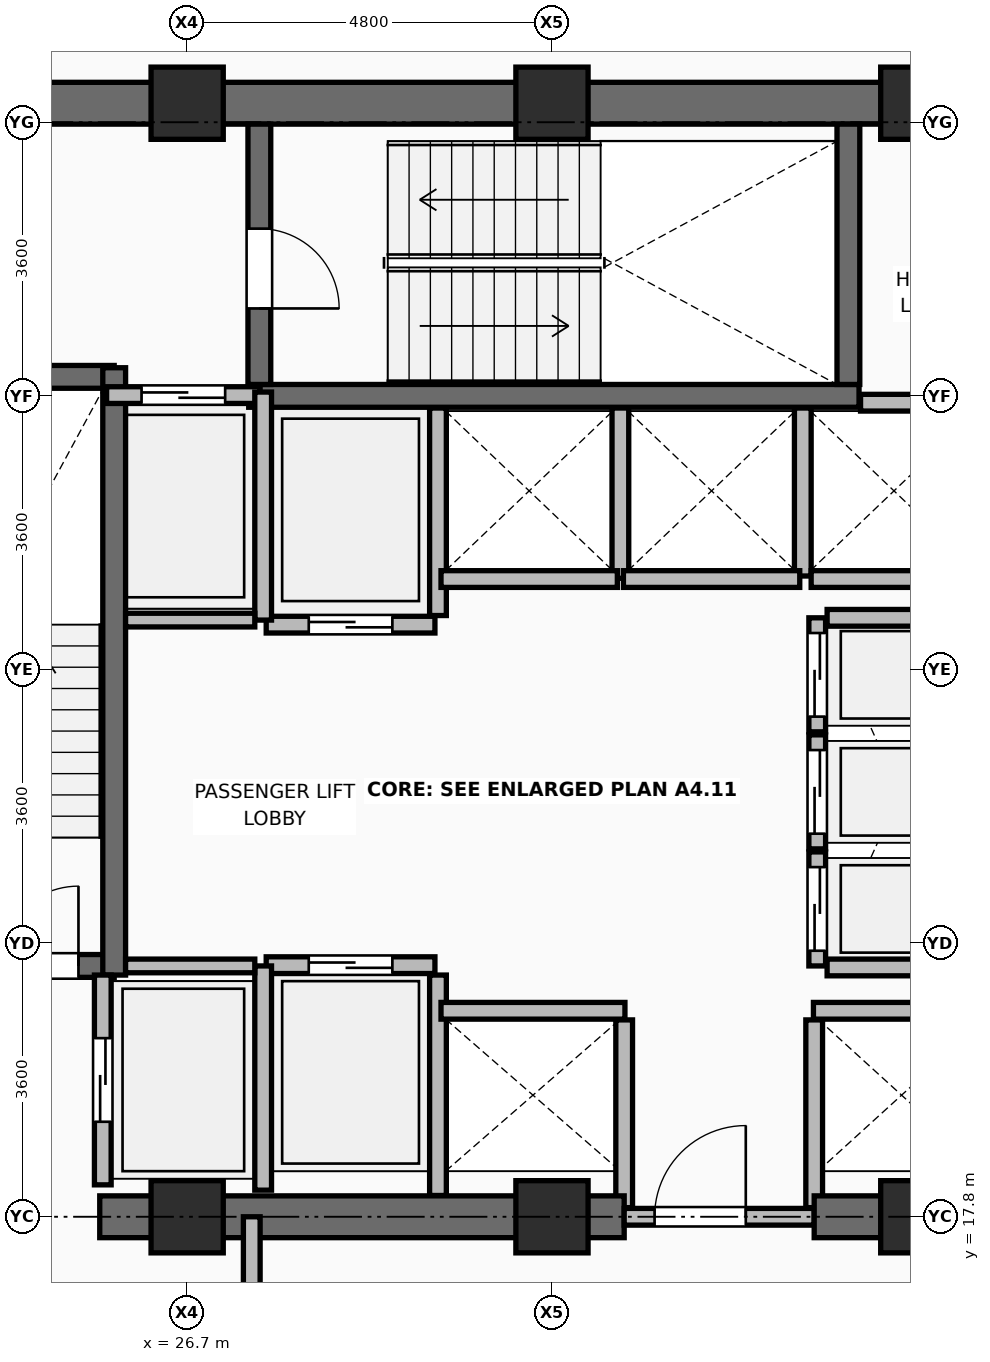
"""IFC4 building model, lengths in metres.
Left out: names, types, materials, properties, quantities, classifications, styles, units other than length and angle.
Written with IfcOpenShell. Run it as: python <this file> out.ifc"""

import sys

from ifc_helpers import new_model, si_unit, direction, frame, frame_2d, origin, origin_2d, place, context, subcontext, project, spatial, rectangle, extrude, element, fill, save


model = new_model("IFC4")
c1 = context("Model", 3, precision=1e-05, world=origin(), true_north=direction((0.0, 1.0)))
c2 = subcontext(c1, "Body", "Model", "MODEL_VIEW")
j1 = project(units=[si_unit("LENGTHUNIT", "METRE"), si_unit("PLANEANGLEUNIT", "RADIAN")], contexts=[c1])
p1 = place(None, origin())
s1 = spatial("IfcSite", under=j1, at=p1, CompositionType="ELEMENT")
p2 = place(p1, origin())
s2 = spatial("IfcBuilding", under=s1, at=p2, CompositionType="ELEMENT")
p3 = place(p2, frame((0.0, 0.0, 157.2)))
s3 = spatial("IfcBuildingStorey", under=s2, at=p3, CompositionType="ELEMENT", Elevation=157.2)
for number, where, z_axis, x_axis in (
    (1, (26.7, 17.8, 0.0), (0.0, 0.0, 1.0), (1.0, 0.0, 0.0)),
    (2, (31.5, 17.8, 0.0), (0.0, 0.0, 1.0), (1.0, 0.0, 0.0)),
    (3, (36.3, 17.8, 0.0), (0.0, 0.0, 1.0), (1.0, 0.0, 0.0)),
    (4, (26.7, 32.45, 0.0), (0.0, 0.0, 1.0), (1.0, 0.0, 0.0)),
    (5, (31.5, 32.45, 0.0), (0.0, 0.0, 1.0), (1.0, 0.0, 0.0)),
    (6, (36.3, 32.45, 0.0), (0.0, 0.0, 1.0), (1.0, 0.0, 0.0)),
):
    element("IfcColumn", number, at=place(p3, frame(where, z_axis=z_axis, x_axis=x_axis)), inside=s3, PredefinedType="COLUMN", context=c2, shape_type="SweptSolid", body=[
        extrude(rectangle(XDim=0.95, YDim=0.95, at=origin_2d()), origin(), (0.0, 0.0, 1.0), 3.75),
    ])
p4 = place(p3, frame((30.0, 18.08, 0.0), z_axis=(0.0, 0.0, 1.0), x_axis=(0.0, 1.0, 0.0)))
e7 = element("IfcWall", 7, at=p4, inside=s3, PredefinedType="PARTITIONING", context=c2, shape_type="SweptSolid", body=[
    extrude(rectangle(XDim=2.9, YDim=0.22, at=frame_2d((1.45, 0.0))), origin(), (0.0, 0.0, 1.0), 3.545),
])
for number, where, z_axis, x_axis in (
    (8, (32.45, 17.92, 0.0), (0.0, 0.0, 1.0), (0.0, 1.0, 0.0)),
    (9, (34.95, 17.92, 0.0), (0.0, 0.0, 1.0), (0.0, 1.0, 0.0)),
):
    element("IfcWall", number, at=place(p3, frame(where, z_axis=z_axis, x_axis=x_axis)), inside=s3, PredefinedType="PARTITIONING", context=c2, shape_type="SweptSolid", body=[
        extrude(rectangle(XDim=2.47, YDim=0.22, at=frame_2d((1.235, 0.0))), origin(), (0.0, 0.0, 1.0), 3.006),
    ])
p5 = place(p3, frame((30.0, 25.71, 0.0), z_axis=(0.0, 0.0, 1.0), x_axis=(0.0, 1.0, 0.0)))
e10 = element("IfcWall", 10, at=p5, inside=s3, PredefinedType="PARTITIONING", context=c2, shape_type="SweptSolid", body=[
    extrude(rectangle(XDim=2.73, YDim=0.22, at=frame_2d((1.365, 0.0))), origin(), (0.0, 0.0, 1.0), 3.545),
])
p6 = place(p3, frame((32.4, 26.2, 0.0), z_axis=(0.0, 0.0, 1.0), x_axis=(0.0, 1.0, 0.0)))
e11 = element("IfcWall", 11, at=p6, inside=s3, PredefinedType="PARTITIONING", context=c2, shape_type="SweptSolid", body=[
    extrude(rectangle(XDim=2.24, YDim=0.22, at=frame_2d((1.12, 0.0))), origin(), (0.0, 0.0, 1.0), 3.545),
])
p7 = place(p3, frame((34.8, 26.23, 0.0), z_axis=(0.0, 0.0, 1.0), x_axis=(0.0, 1.0, 0.0)))
e12 = element("IfcWall", 12, at=p7, inside=s3, PredefinedType="PARTITIONING", context=c2, shape_type="SweptSolid", body=[
    extrude(rectangle(XDim=2.21, YDim=0.22, at=frame_2d((1.105, 0.0))), origin(), (0.0, 0.0, 1.0), 3.545),
])
p8 = place(p3, frame((34.91, 26.19, 0.0), z_axis=(0.0, 0.0, 1.0), x_axis=(1.0, 0.0, 0.0)))
e13 = element("IfcWall", 13, at=p8, inside=s3, PredefinedType="PARTITIONING", context=c2, shape_type="SweptSolid", body=[
    extrude(rectangle(XDim=2.14, YDim=0.22, at=frame_2d((1.07, 0.0))), origin(), (0.0, 0.0, 1.0), 3.545),
])
p9 = place(p3, frame((25.55, 17.8, 0.0), z_axis=(0.0, 0.0, 1.0), x_axis=(1.0, 0.0, 0.0)))
e14 = element("IfcWall", 14, at=p9, inside=s3, PredefinedType="SHEAR", context=c2, shape_type="SweptSolid", body=[
    extrude(rectangle(XDim=6.9, YDim=0.55, at=frame_2d((3.45, 0.0))), origin(), (0.0, 0.0, 1.0), 3.57),
])
p10 = place(p3, frame((32.45, 17.8, 0.0), z_axis=(0.0, 0.0, 1.0), x_axis=(1.0, 0.0, 0.0)))
e15 = element("IfcWall", 15, at=p10, inside=s3, PredefinedType="PARTITIONING", context=c2, shape_type="SweptSolid", body=[
    extrude(rectangle(XDim=2.5, YDim=0.22, at=frame_2d((1.25, 0.0))), origin(), (0.0, 0.0, 1.0), 3.006),
])
p11 = place(p10, frame((0.4, 0.0, 0.0)))
e16 = element("IfcOpeningElement", 16, at=p11, cuts=e15, PredefinedType="OPENING", context=c2, shape_type="SweptSolid", body=[
    extrude(rectangle(XDim=1.2, YDim=2.1, at=frame_2d((0.6, 1.05))), frame((0.0, 0.12, 0.0), z_axis=(0.0, -1.0, 0.0), x_axis=(1.0, 0.0, 0.0)), (0.0, 0.0, 1.0), 0.24),
])
p12 = place(p3, frame((34.95, 17.8, 0.0), z_axis=(0.0, 0.0, 1.0), x_axis=(1.0, 0.0, 0.0)))
e17 = element("IfcWall", 17, at=p12, inside=s3, PredefinedType="SHEAR", context=c2, shape_type="SweptSolid", body=[
    extrude(rectangle(XDim=6.425, YDim=0.55, at=frame_2d((3.212, 0.0))), origin(), (0.0, 0.0, 1.0), 3.57),
])
p13 = place(p3, frame((21.625, 32.45, 0.0), z_axis=(0.0, 0.0, 1.0), x_axis=(1.0, 0.0, 0.0)))
e18 = element("IfcWall", 18, at=p13, inside=s3, PredefinedType="SHEAR", context=c2, shape_type="SweptSolid", body=[
    extrude(rectangle(XDim=19.75, YDim=0.55, at=frame_2d((9.875, 0.0))), origin(), (0.0, 0.0, 1.0), 3.57),
])
p14 = place(p13, frame((2.125, 0.0, 0.0)))
e19 = element("IfcOpeningElement", 19, at=p14, cuts=e18, PredefinedType="OPENING", context=c2, shape_type="SweptSolid", body=[
    extrude(rectangle(XDim=1.1, YDim=2.1, at=frame_2d((0.55, 1.05))), frame((0.0, 0.285, 0.0), z_axis=(0.0, -1.0, 0.0), x_axis=(1.0, 0.0, 0.0)), (0.0, 0.0, 1.0), 0.57),
])
p15 = place(p13, frame((15.515, 0.0, 0.0)))
e20 = element("IfcOpeningElement", 20, at=p15, cuts=e18, PredefinedType="OPENING", context=c2, shape_type="SweptSolid", body=[
    extrude(rectangle(XDim=1.0, YDim=2.1, at=frame_2d((0.5, 1.05))), frame((0.0, 0.285, 0.0), z_axis=(0.0, -1.0, 0.0), x_axis=(1.0, 0.0, 0.0)), (0.0, 0.0, 1.0), 0.57),
])
p16 = place(p13, frame((17.525, 0.0, 0.0)))
e21 = element("IfcOpeningElement", 21, at=p16, cuts=e18, PredefinedType="OPENING", context=c2, shape_type="SweptSolid", body=[
    extrude(rectangle(XDim=0.9, YDim=2.1, at=frame_2d((0.45, 1.05))), frame((0.0, 0.285, 0.0), z_axis=(0.0, -1.0, 0.0), x_axis=(1.0, 0.0, 0.0)), (0.0, 0.0, 1.0), 0.57),
])
p17 = place(p3, frame((22.175, 21.1, 0.0), z_axis=(0.0, 0.0, 1.0), x_axis=(1.0, 0.0, 0.0)))
e22 = element("IfcWall", 22, at=p17, inside=s3, PredefinedType="SHEAR", context=c2, shape_type="SweptSolid", body=[
    extrude(rectangle(XDim=3.565, YDim=0.3, at=frame_2d((1.782, 0.0))), origin(), (0.0, 0.0, 1.0), 3.57),
])
p18 = place(p17, frame((2.045, 0.0, 0.0)))
e23 = element("IfcOpeningElement", 23, at=p18, cuts=e22, PredefinedType="OPENING", context=c2, shape_type="SweptSolid", body=[
    extrude(rectangle(XDim=1.05, YDim=2.1, at=frame_2d((0.525, 1.05))), frame((0.0, 0.16, 0.0), z_axis=(0.0, -1.0, 0.0), x_axis=(1.0, 0.0, 0.0)), (0.0, 0.0, 1.0), 0.32),
])
p19 = place(p3, frame((22.175, 28.85, 0.0), z_axis=(0.0, 0.0, 1.0), x_axis=(1.0, 0.0, 0.0)))
e24 = element("IfcWall", 24, at=p19, inside=s3, PredefinedType="SHEAR", context=c2, shape_type="SweptSolid", body=[
    extrude(rectangle(XDim=3.565, YDim=0.3, at=frame_2d((1.782, 0.0))), origin(), (0.0, 0.0, 1.0), 3.57),
])
p20 = place(p3, frame((25.74, 20.98, 0.0), z_axis=(0.0, 0.0, 1.0), x_axis=(0.0, 1.0, 0.0)))
e25 = element("IfcWall", 25, at=p20, inside=s3, PredefinedType="SHEAR", context=c2, shape_type="SweptSolid", body=[
    extrude(rectangle(XDim=7.99, YDim=0.3, at=frame_2d((3.995, 0.0))), origin(), (0.0, 0.0, 1.0), 3.57),
])
p21 = place(p3, frame((27.51, 28.6, 0.0), z_axis=(0.0, 0.0, 1.0), x_axis=(1.0, 0.0, 0.0)))
e26 = element("IfcWall", 26, at=p21, inside=s3, PredefinedType="SHEAR", context=c2, shape_type="SweptSolid", body=[
    extrude(rectangle(XDim=8.03, YDim=0.3, at=frame_2d((4.015, 0.0))), origin(), (0.0, 0.0, 1.0), 3.57),
])
p22 = place(p3, frame((27.65, 28.75, 0.0), z_axis=(0.0, 0.0, 1.0), x_axis=(0.0, 1.0, 0.0)))
e27 = element("IfcWall", 27, at=p22, inside=s3, PredefinedType="SHEAR", context=c2, shape_type="SweptSolid", body=[
    extrude(rectangle(XDim=3.425, YDim=0.3, at=frame_2d((1.712, 0.0))), origin(), (0.0, 0.0, 1.0), 3.57),
])
p23 = place(p22, frame((1.0, 0.0, 0.0)))
e28 = element("IfcOpeningElement", 28, at=p23, cuts=e27, PredefinedType="OPENING", context=c2, shape_type="SweptSolid", body=[
    extrude(rectangle(XDim=1.05, YDim=2.1, at=frame_2d((0.525, 1.05))), frame((0.0, 0.16, 0.0), z_axis=(0.0, -1.0, 0.0), x_axis=(1.0, 0.0, 0.0)), (0.0, 0.0, 1.0), 0.32),
])
p24 = place(p3, frame((35.4, 28.75, 0.0), z_axis=(0.0, 0.0, 1.0), x_axis=(0.0, 1.0, 0.0)))
e29 = element("IfcWall", 29, at=p24, inside=s3, PredefinedType="SHEAR", context=c2, shape_type="SweptSolid", body=[
    extrude(rectangle(XDim=3.425, YDim=0.3, at=frame_2d((1.712, 0.0))), origin(), (0.0, 0.0, 1.0), 3.57),
])
p25 = place(p3, frame((25.59, 18.22, 0.0), z_axis=(0.0, 0.0, 1.0), x_axis=(0.0, 1.0, 0.0)))
e30 = element("IfcWall", 30, at=p25, inside=s3, PredefinedType="PARTITIONING", context=c2, shape_type="SweptSolid", body=[
    extrude(rectangle(XDim=2.76, YDim=0.22, at=frame_2d((1.38, 0.0))), origin(), (0.0, 0.0, 1.0), 3.55),
])
p26 = place(p25, frame((0.83, 0.0, 0.0)))
e31 = element("IfcOpeningElement", 31, at=p26, cuts=e30, PredefinedType="OPENING", context=c2, shape_type="SweptSolid", body=[
    extrude(rectangle(XDim=1.1, YDim=2.2, at=frame_2d((0.55, 1.1))), frame((0.0, 0.12, 0.0), z_axis=(0.0, -1.0, 0.0), x_axis=(1.0, 0.0, 0.0)), (0.0, 0.0, 1.0), 0.24),
])
p27 = place(p3, frame((25.64, 28.61, 0.0), z_axis=(0.0, 0.0, 1.0), x_axis=(1.0, 0.0, 0.0)))
e32 = element("IfcWall", 32, at=p27, inside=s3, PredefinedType="PARTITIONING", context=c2, shape_type="SweptSolid", body=[
    extrude(rectangle(XDim=2.02, YDim=0.22, at=frame_2d((1.01, 0.0))), origin(), (0.0, 0.0, 1.0), 3.55),
])
p28 = place(p27, frame((0.46, 0.0, 0.0)))
e33 = element("IfcOpeningElement", 33, at=p28, cuts=e32, PredefinedType="OPENING", context=c2, shape_type="SweptSolid", body=[
    extrude(rectangle(XDim=1.1, YDim=2.2, at=frame_2d((0.55, 1.1))), frame((0.0, 0.12, 0.0), z_axis=(0.0, -1.0, 0.0), x_axis=(1.0, 0.0, 0.0)), (0.0, 0.0, 1.0), 0.24),
])
p29 = place(p3, frame((27.74, 21.11, 0.0), z_axis=(0.0, 0.0, 1.0), x_axis=(1.0, 0.0, 0.0)))
e34 = element("IfcWall", 34, at=p29, inside=s3, PredefinedType="PARTITIONING", context=c2, shape_type="SweptSolid", body=[
    extrude(rectangle(XDim=2.22, YDim=0.22, at=frame_2d((1.11, 0.0))), origin(), (0.0, 0.0, 1.0), 3.55),
])
p30 = place(p29, frame((0.56, 0.0, 0.0)))
e35 = element("IfcOpeningElement", 35, at=p30, cuts=e34, PredefinedType="OPENING", context=c2, shape_type="SweptSolid", body=[
    extrude(rectangle(XDim=1.1, YDim=2.2, at=frame_2d((0.55, 1.1))), frame((0.0, 0.12, 0.0), z_axis=(0.0, -1.0, 0.0), x_axis=(1.0, 0.0, 0.0)), (0.0, 0.0, 1.0), 0.24),
])
p31 = place(p3, frame((27.74, 25.59, 0.0), z_axis=(0.0, 0.0, 1.0), x_axis=(1.0, 0.0, 0.0)))
e36 = element("IfcWall", 36, at=p31, inside=s3, PredefinedType="PARTITIONING", context=c2, shape_type="SweptSolid", body=[
    extrude(rectangle(XDim=2.22, YDim=0.22, at=frame_2d((1.11, 0.0))), origin(), (0.0, 0.0, 1.0), 3.55),
])
p32 = place(p31, frame((0.56, 0.0, 0.0)))
e37 = element("IfcOpeningElement", 37, at=p32, cuts=e36, PredefinedType="OPENING", context=c2, shape_type="SweptSolid", body=[
    extrude(rectangle(XDim=1.1, YDim=2.2, at=frame_2d((0.55, 1.1))), frame((0.0, 0.12, 0.0), z_axis=(0.0, -1.0, 0.0), x_axis=(1.0, 0.0, 0.0)), (0.0, 0.0, 1.0), 0.24),
])
p33 = place(p3, frame((30.04, 20.51, 0.0), z_axis=(0.0, 0.0, 1.0), x_axis=(1.0, 0.0, 0.0)))
e38 = element("IfcWall", 38, at=p33, inside=s3, PredefinedType="PARTITIONING", context=c2, shape_type="SweptSolid", body=[
    extrude(rectangle(XDim=2.42, YDim=0.22, at=frame_2d((1.21, 0.0))), origin(), (0.0, 0.0, 1.0), 3.55),
])
p34 = place(p3, frame((34.94, 20.51, 0.0), z_axis=(0.0, 0.0, 1.0), x_axis=(1.0, 0.0, 0.0)))
e39 = element("IfcWall", 39, at=p34, inside=s3, PredefinedType="PARTITIONING", context=c2, shape_type="SweptSolid", body=[
    extrude(rectangle(XDim=2.24, YDim=0.22, at=frame_2d((1.12, 0.0))), origin(), (0.0, 0.0, 1.0), 3.55),
])
for number, where, z_axis, x_axis in (
    (40, (30.04, 26.19, 0.0), (0.0, 0.0, 1.0), (1.0, 0.0, 0.0)),
    (41, (32.44, 26.19, 0.0), (0.0, 0.0, 1.0), (1.0, 0.0, 0.0)),
):
    element("IfcWall", number, at=place(p3, frame(where, z_axis=z_axis, x_axis=x_axis)), inside=s3, PredefinedType="PARTITIONING", context=c2, shape_type="SweptSolid", body=[
        extrude(rectangle(XDim=2.32, YDim=0.22, at=frame_2d((1.16, 0.0))), origin(), (0.0, 0.0, 1.0), 3.55),
    ])
p35 = place(p3, frame((35.56, 28.51, 0.0), z_axis=(0.0, 0.0, 1.0), x_axis=(1.0, 0.0, 0.0)))
e42 = element("IfcWall", 42, at=p35, inside=s3, PredefinedType="PARTITIONING", context=c2, shape_type="SweptSolid", body=[
    extrude(rectangle(XDim=1.6, YDim=0.22, at=frame_2d((0.8, 0.0))), origin(), (0.0, 0.0, 1.0), 3.55),
])
p36 = place(p3, frame((34.99, 21.1, 0.0), z_axis=(0.0, 0.0, 1.0), x_axis=(0.0, 1.0, 0.0)))
e43 = element("IfcWall", 43, at=p36, inside=s3, PredefinedType="PARTITIONING", context=c2, shape_type="SweptSolid", body=[
    extrude(rectangle(XDim=1.5, YDim=0.22, at=frame_2d((0.75, 0.0))), origin(), (0.0, 0.0, 1.0), 3.55),
])
p37 = place(p36, frame((0.2, 0.0, 0.0)))
e44 = element("IfcOpeningElement", 44, at=p37, cuts=e43, PredefinedType="OPENING", context=c2, shape_type="SweptSolid", body=[
    extrude(rectangle(XDim=1.1, YDim=2.2, at=frame_2d((0.55, 1.1))), frame((0.0, 0.12, 0.0), z_axis=(0.0, -1.0, 0.0), x_axis=(1.0, 0.0, 0.0)), (0.0, 0.0, 1.0), 0.24),
])
p38 = place(p3, frame((34.99, 22.64, 0.0), z_axis=(0.0, 0.0, 1.0), x_axis=(0.0, 1.0, 0.0)))
e45 = element("IfcWall", 45, at=p38, inside=s3, PredefinedType="PARTITIONING", context=c2, shape_type="SweptSolid", body=[
    extrude(rectangle(XDim=1.5, YDim=0.22, at=frame_2d((0.75, 0.0))), origin(), (0.0, 0.0, 1.0), 3.55),
])
p39 = place(p38, frame((0.2, 0.0, 0.0)))
e46 = element("IfcOpeningElement", 46, at=p39, cuts=e45, PredefinedType="OPENING", context=c2, shape_type="SweptSolid", body=[
    extrude(rectangle(XDim=1.1, YDim=2.2, at=frame_2d((0.55, 1.1))), frame((0.0, 0.12, 0.0), z_axis=(0.0, -1.0, 0.0), x_axis=(1.0, 0.0, 0.0)), (0.0, 0.0, 1.0), 0.24),
])
p40 = place(p3, frame((34.99, 24.18, 0.0), z_axis=(0.0, 0.0, 1.0), x_axis=(0.0, 1.0, 0.0)))
e47 = element("IfcWall", 47, at=p40, inside=s3, PredefinedType="PARTITIONING", context=c2, shape_type="SweptSolid", body=[
    extrude(rectangle(XDim=1.5, YDim=0.22, at=frame_2d((0.75, 0.0))), origin(), (0.0, 0.0, 1.0), 3.55),
])
p41 = place(p40, frame((0.2, 0.0, 0.0)))
e48 = element("IfcOpeningElement", 48, at=p41, cuts=e47, PredefinedType="OPENING", context=c2, shape_type="SweptSolid", body=[
    extrude(rectangle(XDim=1.1, YDim=2.2, at=frame_2d((0.55, 1.1))), frame((0.0, 0.12, 0.0), z_axis=(0.0, -1.0, 0.0), x_axis=(1.0, 0.0, 0.0)), (0.0, 0.0, 1.0), 0.24),
])
p42 = place(p3, frame((27.7, 18.15, 0.0), z_axis=(0.0, 0.0, 1.0), x_axis=(0.0, 1.0, 0.0)))
e49 = element("IfcWall", 49, at=p42, inside=s3, PredefinedType="PARTITIONING", context=c2, shape_type="SweptSolid", body=[
    extrude(rectangle(XDim=2.95, YDim=0.22, at=frame_2d((1.475, 0.0))), origin(), (0.0, 0.0, 1.0), 3.55),
])
p43 = place(p3, frame((27.7, 25.65, 0.0), z_axis=(0.0, 0.0, 1.0), x_axis=(0.0, 1.0, 0.0)))
e50 = element("IfcWall", 50, at=p43, inside=s3, PredefinedType="PARTITIONING", context=c2, shape_type="SweptSolid", body=[
    extrude(rectangle(XDim=3.0, YDim=0.22, at=frame_2d((1.5, 0.0))), origin(), (0.0, 0.0, 1.0), 3.55),
])
for number, where, z_axis, x_axis in (
    (51, (35.12, 21.08, 0.0), (0.0, 0.0, 1.0), (1.0, 0.0, 0.0)),
    (52, (35.12, 25.68, 0.0), (0.0, 0.0, 1.0), (1.0, 0.0, 0.0)),
):
    element("IfcWall", number, at=place(p3, frame(where, z_axis=z_axis, x_axis=x_axis)), inside=s3, PredefinedType="PARTITIONING", context=c2, shape_type="SweptSolid", body=[
        extrude(rectangle(XDim=1.94, YDim=0.22, at=frame_2d((0.97, 0.0))), origin(), (0.0, 0.0, 1.0), 3.55),
    ])
for number, where, z_axis, x_axis in (
    (53, (25.89, 21.1, 0.0), (0.0, 0.0, 1.0), (1.0, 0.0, 0.0)),
    (54, (25.89, 25.65, 0.0), (0.0, 0.0, 1.0), (1.0, 0.0, 0.0)),
):
    element("IfcWall", number, at=place(p3, frame(where, z_axis=z_axis, x_axis=x_axis)), inside=s3, PredefinedType="PARTITIONING", context=c2, shape_type="SweptSolid", body=[
        extrude(rectangle(XDim=1.7, YDim=0.18, at=frame_2d((0.85, 0.0))), origin(), (0.0, 0.0, 1.0), 3.55),
    ])
p44 = place(p3, frame((27.55, 14.35, 0.0), z_axis=(0.0, 0.0, 1.0), x_axis=(0.0, 1.0, 0.0)))
e55 = element("IfcWall", 55, at=p44, inside=s3, PredefinedType="PARTITIONING", context=c2, shape_type="SweptSolid", body=[
    extrude(rectangle(XDim=3.45, YDim=0.22, at=frame_2d((1.725, 0.0))), origin(), (0.0, 0.0, 1.0), 3.006),
])
p45 = place(p44, frame((1.175, 0.0, 0.0)))
e56 = element("IfcOpeningElement", 56, at=p45, cuts=e55, PredefinedType="OPENING", context=c2, shape_type="SweptSolid", body=[
    extrude(rectangle(XDim=1.1, YDim=2.1, at=frame_2d((0.55, 1.05))), frame((0.0, 0.12, 0.0), z_axis=(0.0, -1.0, 0.0), x_axis=(1.0, 0.0, 0.0)), (0.0, 0.0, 1.0), 0.24),
])
p46 = place(p11, origin())
e57 = element("IfcDoor", 57, at=p46, inside=s3, OperationType="SINGLE_SWING_RIGHT", PredefinedType="DOOR", context=c2, shape_type="SweptSolid", body=[
    extrude(rectangle(XDim=1.2, YDim=2.1, at=frame_2d((0.6, 1.05))), frame((0.0, 0.025, 0.0), z_axis=(0.0, -1.0, 0.0), x_axis=(1.0, 0.0, 0.0)), (0.0, 0.0, 1.0), 0.05),
])
fill(e16, e57)
p47 = place(p18, origin())
e58 = element("IfcDoor", 58, at=p47, inside=s3, OperationType="SINGLE_SWING_RIGHT", PredefinedType="DOOR", context=c2, shape_type="SweptSolid", body=[
    extrude(rectangle(XDim=1.05, YDim=2.1, at=frame_2d((0.525, 1.05))), frame((0.0, 0.025, 0.0), z_axis=(0.0, -1.0, 0.0), x_axis=(1.0, 0.0, 0.0)), (0.0, 0.0, 1.0), 0.05),
])
fill(e23, e58)
p48 = place(p23, frame((1.05, 0.0, 0.0), z_axis=(0.0, 0.0, 1.0), x_axis=(-1.0, 0.0, 0.0)))
e59 = element("IfcDoor", 59, at=p48, inside=s3, OperationType="SINGLE_SWING_RIGHT", PredefinedType="DOOR", context=c2, shape_type="SweptSolid", body=[
    extrude(rectangle(XDim=1.05, YDim=2.1, at=frame_2d((0.525, 1.05))), frame((0.0, 0.025, 0.0), z_axis=(0.0, -1.0, 0.0), x_axis=(1.0, 0.0, 0.0)), (0.0, 0.0, 1.0), 0.05),
])
fill(e28, e59)
p49 = place(p26, origin())
e60 = element("IfcDoor", 60, at=p49, inside=s3, OperationType="DOUBLE_DOOR_SLIDING", PredefinedType="DOOR", context=c2, shape_type="SweptSolid", body=[
    extrude(rectangle(XDim=1.1, YDim=2.2, at=frame_2d((0.55, 1.1))), frame((0.0, 0.025, 0.0), z_axis=(0.0, -1.0, 0.0), x_axis=(1.0, 0.0, 0.0)), (0.0, 0.0, 1.0), 0.05),
])
fill(e31, e60)
p50 = place(p28, origin())
e61 = element("IfcDoor", 61, at=p50, inside=s3, OperationType="DOUBLE_DOOR_SLIDING", PredefinedType="DOOR", context=c2, shape_type="SweptSolid", body=[
    extrude(rectangle(XDim=1.1, YDim=2.2, at=frame_2d((0.55, 1.1))), frame((0.0, 0.025, 0.0), z_axis=(0.0, -1.0, 0.0), x_axis=(1.0, 0.0, 0.0)), (0.0, 0.0, 1.0), 0.05),
])
fill(e33, e61)
p51 = place(p30, origin())
e62 = element("IfcDoor", 62, at=p51, inside=s3, OperationType="DOUBLE_DOOR_SLIDING", PredefinedType="DOOR", context=c2, shape_type="SweptSolid", body=[
    extrude(rectangle(XDim=1.1, YDim=2.2, at=frame_2d((0.55, 1.1))), frame((0.0, 0.025, 0.0), z_axis=(0.0, -1.0, 0.0), x_axis=(1.0, 0.0, 0.0)), (0.0, 0.0, 1.0), 0.05),
])
fill(e35, e62)
p52 = place(p32, frame((1.1, 0.0, 0.0), z_axis=(0.0, 0.0, 1.0), x_axis=(-1.0, 0.0, 0.0)))
e63 = element("IfcDoor", 63, at=p52, inside=s3, OperationType="DOUBLE_DOOR_SLIDING", PredefinedType="DOOR", context=c2, shape_type="SweptSolid", body=[
    extrude(rectangle(XDim=1.1, YDim=2.2, at=frame_2d((0.55, 1.1))), frame((0.0, 0.025, 0.0), z_axis=(0.0, -1.0, 0.0), x_axis=(1.0, 0.0, 0.0)), (0.0, 0.0, 1.0), 0.05),
])
fill(e37, e63)
p53 = place(p37, origin())
e64 = element("IfcDoor", 64, at=p53, inside=s3, OperationType="DOUBLE_DOOR_SLIDING", PredefinedType="DOOR", context=c2, shape_type="SweptSolid", body=[
    extrude(rectangle(XDim=1.1, YDim=2.2, at=frame_2d((0.55, 1.1))), frame((0.0, 0.025, 0.0), z_axis=(0.0, -1.0, 0.0), x_axis=(1.0, 0.0, 0.0)), (0.0, 0.0, 1.0), 0.05),
])
fill(e44, e64)
p54 = place(p39, origin())
e65 = element("IfcDoor", 65, at=p54, inside=s3, OperationType="DOUBLE_DOOR_SLIDING", PredefinedType="DOOR", context=c2, shape_type="SweptSolid", body=[
    extrude(rectangle(XDim=1.1, YDim=2.2, at=frame_2d((0.55, 1.1))), frame((0.0, 0.025, 0.0), z_axis=(0.0, -1.0, 0.0), x_axis=(1.0, 0.0, 0.0)), (0.0, 0.0, 1.0), 0.05),
])
fill(e46, e65)
p55 = place(p41, origin())
e66 = element("IfcDoor", 66, at=p55, inside=s3, OperationType="DOUBLE_DOOR_SLIDING", PredefinedType="DOOR", context=c2, shape_type="SweptSolid", body=[
    extrude(rectangle(XDim=1.1, YDim=2.2, at=frame_2d((0.55, 1.1))), frame((0.0, 0.025, 0.0), z_axis=(0.0, -1.0, 0.0), x_axis=(1.0, 0.0, 0.0)), (0.0, 0.0, 1.0), 0.05),
])
fill(e48, e66)
save(model, sys.argv[1])
